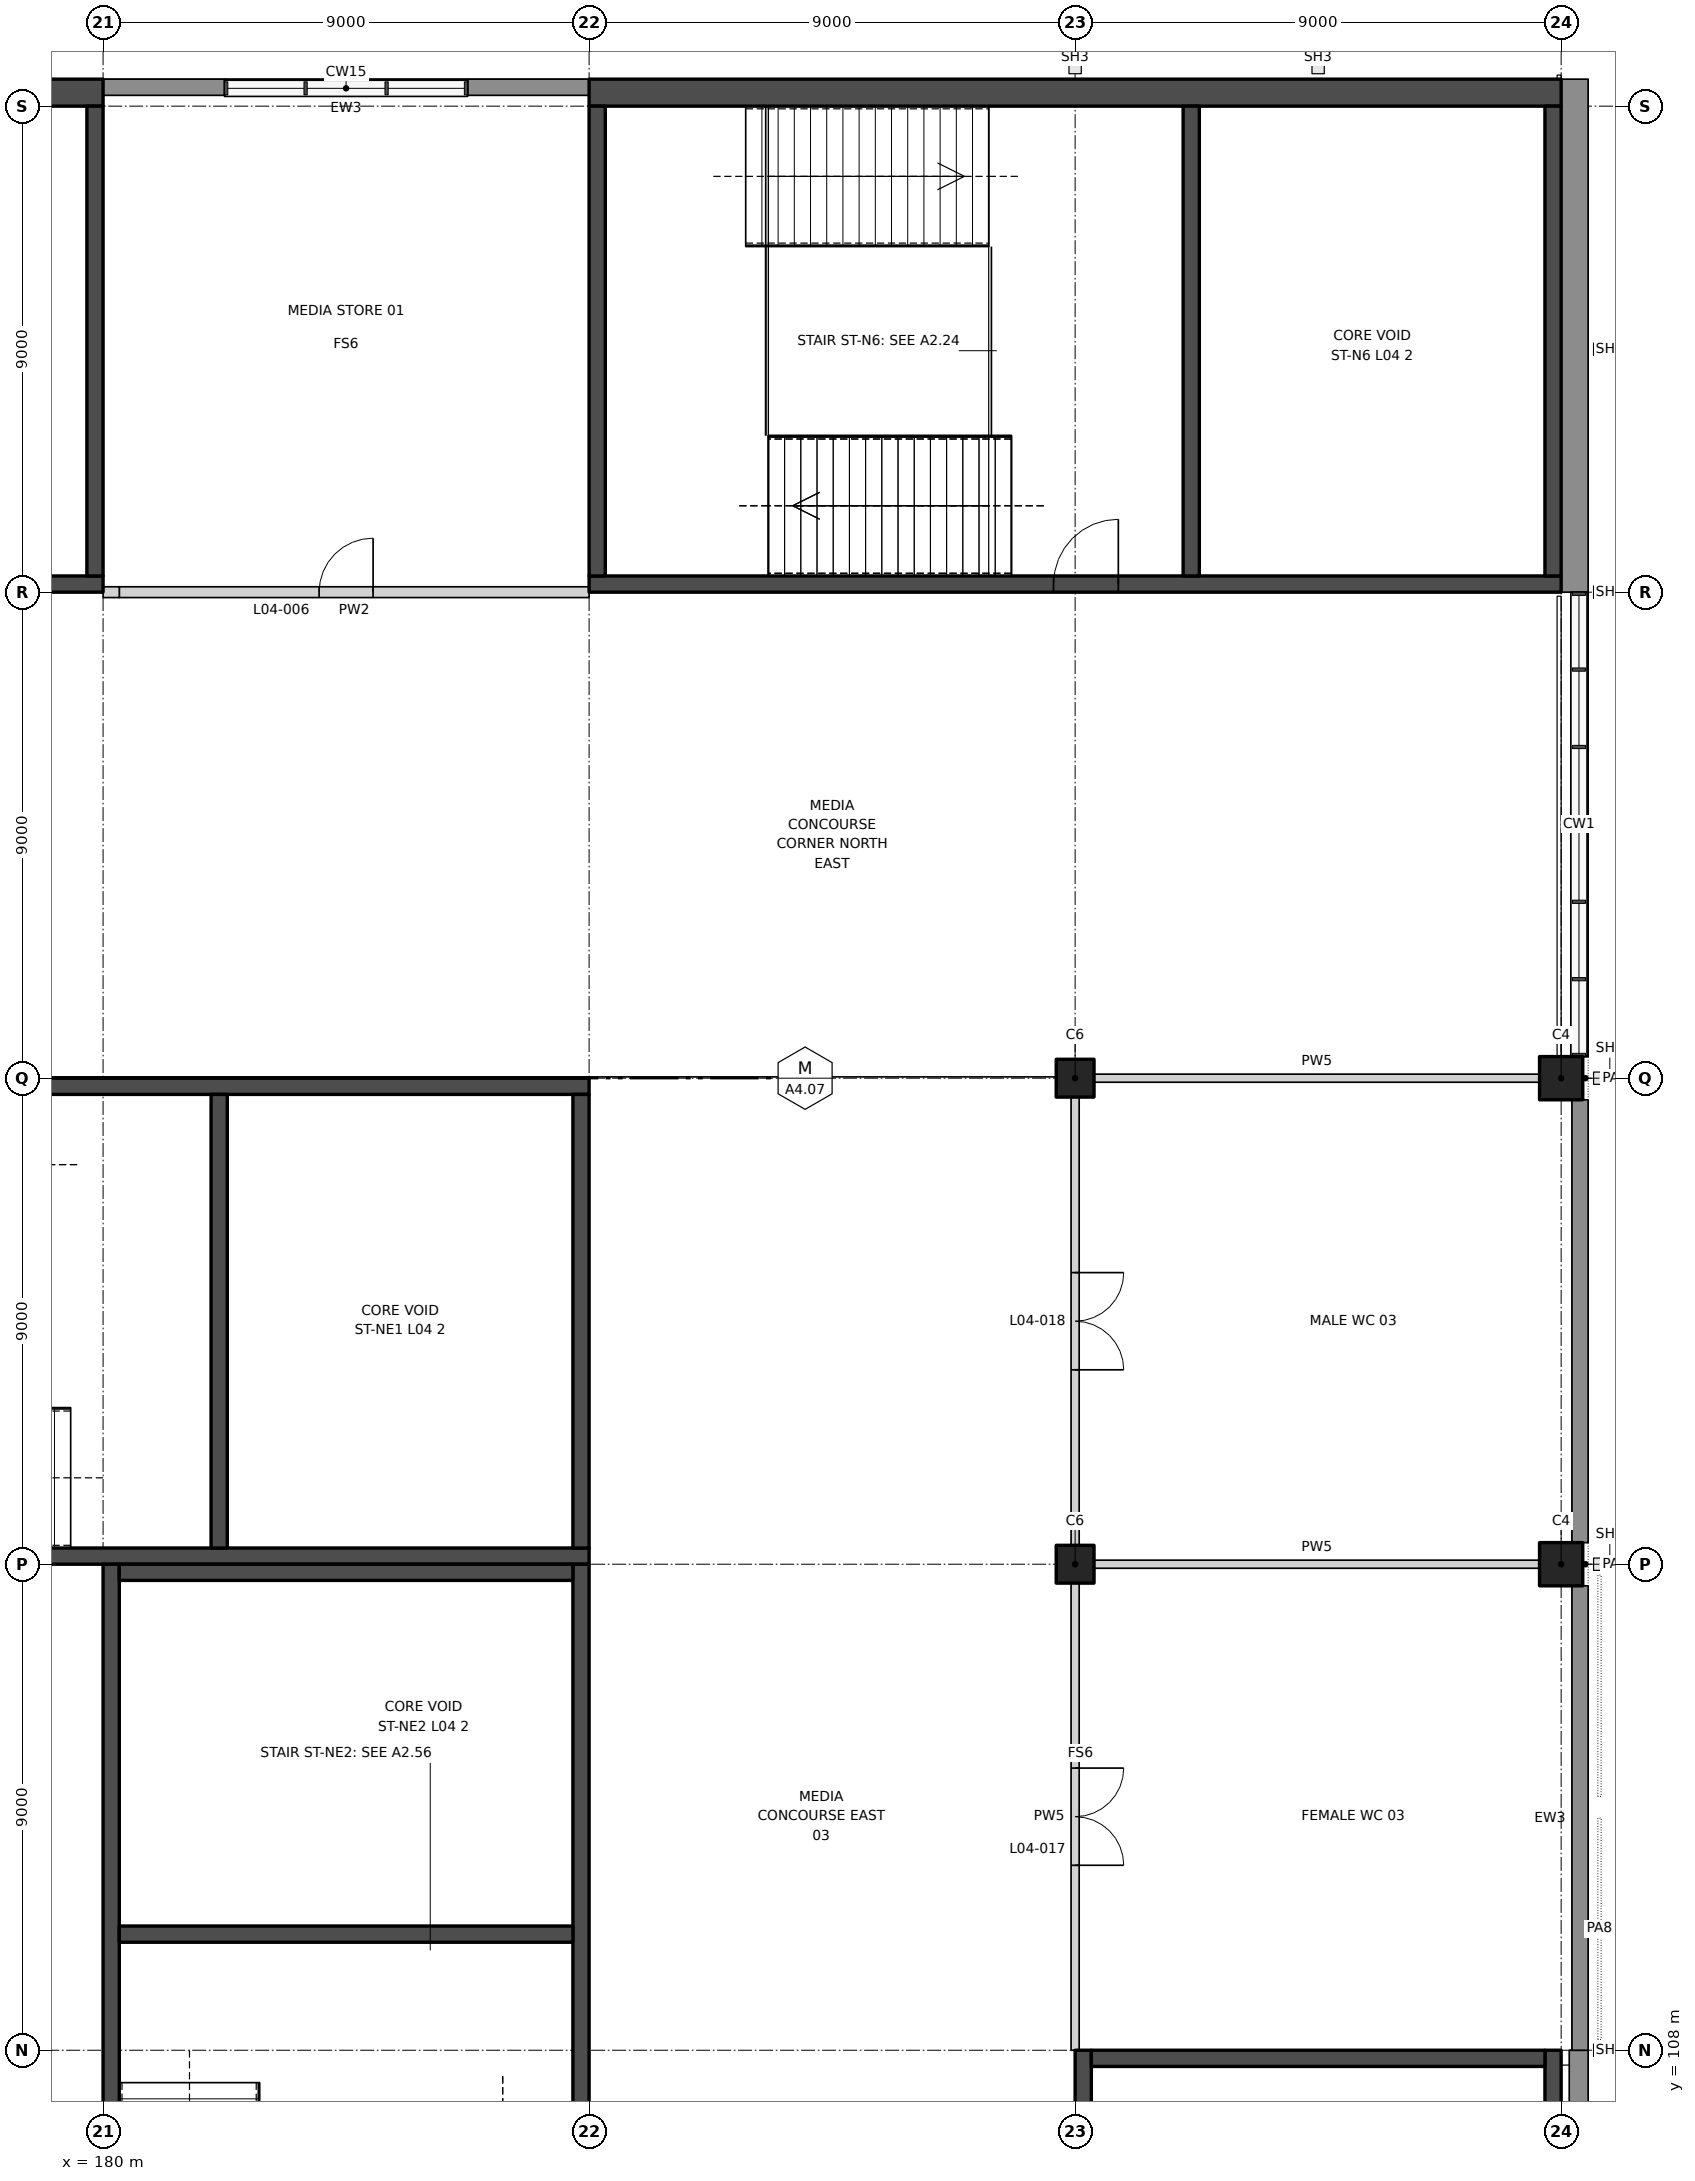
"""IFC4 building model, lengths in metres.
Left out: names, types, materials, properties, quantities, classifications, styles, units other than length and angle.
Written with IfcOpenShell. Run it as: python <this file> out.ifc"""

import sys

from ifc_helpers import new_model, si_unit, direction, frame, frame_2d, origin, origin_2d, place, context, subcontext, project, spatial, rectangle, extrude, element, fill, save


model = new_model("IFC4")
c1 = context("Model", 3, precision=1e-05, world=origin(), true_north=direction((0.0, 1.0)))
c2 = subcontext(c1, "Body", "Model", "MODEL_VIEW")
j1 = project(units=[si_unit("LENGTHUNIT", "METRE"), si_unit("PLANEANGLEUNIT", "RADIAN")], contexts=[c1])
p1 = place(None, origin())
s1 = spatial("IfcSite", under=j1, at=p1, CompositionType="ELEMENT")
p2 = place(p1, origin())
s2 = spatial("IfcBuilding", under=s1, at=p2, CompositionType="ELEMENT")
p3 = place(p2, frame((0.0, 0.0, 28.0)))
s3 = spatial("IfcBuildingStorey", under=s2, at=p3, CompositionType="ELEMENT", Elevation=28.0)
for number, where, z_axis, x_axis in (
    (1, (207.0, 117.0, 0.0), (0.0, 0.0, 1.0), (1.0, 0.0, 0.0)),
    (2, (207.0, 126.0, 0.0), (0.0, 0.0, 1.0), (1.0, 0.0, 0.0)),
):
    element("IfcColumn", number, at=place(p3, frame(where, z_axis=z_axis, x_axis=x_axis)), inside=s3, PredefinedType="COLUMN", context=c2, shape_type="SweptSolid", body=[
        extrude(rectangle(XDim=0.8, YDim=0.8, at=origin_2d()), origin(), (0.0, 0.0, 1.0), 5.5),
    ])
for number, where, z_axis, x_axis in (
    (3, (198.0, 117.0, 0.0), (0.0, 0.0, 1.0), (1.0, 0.0, 0.0)),
    (4, (198.0, 126.0, 0.0), (0.0, 0.0, 1.0), (1.0, 0.0, 0.0)),
):
    element("IfcColumn", number, at=place(p3, frame(where, z_axis=z_axis, x_axis=x_axis)), inside=s3, PredefinedType="COLUMN", context=c2, shape_type="SweptSolid", body=[
        extrude(rectangle(XDim=0.7, YDim=0.7, at=origin_2d()), origin(), (0.0, 0.0, 1.0), 5.5),
    ])
p4 = place(p3, frame((198.35, 117.0, 0.0), z_axis=(0.0, 0.0, 1.0), x_axis=(1.0, 0.0, 0.0)))
e5 = element("IfcWall", 5, at=p4, inside=s3, PredefinedType="PARTITIONING", context=c2, shape_type="SweptSolid", body=[
    extrude(rectangle(XDim=8.25, YDim=0.15, at=frame_2d((4.125, 0.0))), origin(), (0.0, 0.0, 1.0), 9.5),
])
p5 = place(p3, frame((198.35, 126.0, 0.0), z_axis=(0.0, 0.0, 1.0), x_axis=(1.0, 0.0, 0.0)))
e6 = element("IfcWall", 6, at=p5, inside=s3, PredefinedType="PARTITIONING", context=c2, shape_type="SweptSolid", body=[
    extrude(rectangle(XDim=8.25, YDim=0.15, at=frame_2d((4.125, 0.0))), origin(), (0.0, 0.0, 1.0), 4.3),
])
p6 = place(p3, frame((180.3, 135.0, 0.0), z_axis=(0.0, 0.0, 1.0), x_axis=(1.0, 0.0, 0.0)))
e7 = element("IfcWall", 7, at=p6, inside=s3, PredefinedType="PARTITIONING", context=c2, shape_type="SweptSolid", body=[
    extrude(rectangle(XDim=8.7, YDim=0.2, at=frame_2d((4.35, 0.0))), origin(), (0.0, 0.0, 1.0), 4.2),
])
p7 = place(p6, frame((3.7, 0.0, 0.0)))
e8 = element("IfcOpeningElement", 8, at=p7, cuts=e7, PredefinedType="OPENING", context=c2, shape_type="SweptSolid", body=[
    extrude(rectangle(XDim=1.0, YDim=2.1, at=frame_2d((0.5, 1.05))), frame((0.0, 0.11, 0.0), z_axis=(0.0, -1.0, 0.0), x_axis=(1.0, 0.0, 0.0)), (0.0, 0.0, 1.0), 0.22),
])
p8 = place(p3, frame((198.0, 108.0, 0.0), z_axis=(0.0, 0.0, 1.0), x_axis=(0.0, 1.0, 0.0)))
e9 = element("IfcWall", 9, at=p8, inside=s3, PredefinedType="PARTITIONING", context=c2, shape_type="SweptSolid", body=[
    extrude(rectangle(XDim=8.65, YDim=0.15, at=frame_2d((4.325, 0.0))), origin(), (0.0, 0.0, 1.0), 4.2),
])
p9 = place(p8, frame((3.425, 0.0, 0.0)))
e10 = element("IfcOpeningElement", 10, at=p9, cuts=e9, PredefinedType="OPENING", context=c2, shape_type="SweptSolid", body=[
    extrude(rectangle(XDim=1.8, YDim=2.1, at=frame_2d((0.9, 1.05))), frame((0.0, 0.085, 0.0), z_axis=(0.0, -1.0, 0.0), x_axis=(1.0, 0.0, 0.0)), (0.0, 0.0, 1.0), 0.17),
])
p10 = place(p3, frame((198.0, 117.35, 0.0), z_axis=(0.0, 0.0, 1.0), x_axis=(0.0, 1.0, 0.0)))
e11 = element("IfcWall", 11, at=p10, inside=s3, PredefinedType="PARTITIONING", context=c2, shape_type="SweptSolid", body=[
    extrude(rectangle(XDim=8.3, YDim=0.15, at=frame_2d((4.15, 0.0))), origin(), (0.0, 0.0, 1.0), 4.2),
])
p11 = place(p10, frame((3.25, 0.0, 0.0)))
e12 = element("IfcOpeningElement", 12, at=p11, cuts=e11, PredefinedType="OPENING", context=c2, shape_type="SweptSolid", body=[
    extrude(rectangle(XDim=1.8, YDim=2.1, at=frame_2d((0.9, 1.05))), frame((0.0, 0.085, 0.0), z_axis=(0.0, -1.0, 0.0), x_axis=(1.0, 0.0, 0.0)), (0.0, 0.0, 1.0), 0.17),
])
p12 = place(p3, frame((207.325, 99.0, 0.0), z_axis=(0.0, 0.0, 1.0), x_axis=(0.0, 1.0, 0.0)))
e13 = element("IfcWall", 13, at=p12, inside=s3, PredefinedType="SOLIDWALL", context=c2, shape_type="SweptSolid", body=[
    extrude(rectangle(XDim=9.0, YDim=0.35, at=frame_2d((4.5, 0.0))), origin(), (0.0, 0.0, 1.0), 5.5),
])
p13 = place(p3, frame((207.35, 108.0, 0.0), z_axis=(0.0, 0.0, 1.0), x_axis=(0.0, 1.0, 0.0)))
e14 = element("IfcWall", 14, at=p13, inside=s3, PredefinedType="SOLIDWALL", context=c2, shape_type="SweptSolid", body=[
    extrude(rectangle(XDim=8.6, YDim=0.3, at=frame_2d((4.3, 0.0))), origin(), (0.0, 0.0, 1.0), 5.5),
])
p14 = place(p3, frame((207.35, 117.4, 0.0), z_axis=(0.0, 0.0, 1.0), x_axis=(0.0, 1.0, 0.0)))
e15 = element("IfcWall", 15, at=p14, inside=s3, PredefinedType="SOLIDWALL", context=c2, shape_type="SweptSolid", body=[
    extrude(rectangle(XDim=8.2, YDim=0.3, at=frame_2d((4.1, 0.0))), origin(), (0.0, 0.0, 1.0), 5.5),
])
p15 = place(p3, frame((207.35, 126.4, 0.0), z_axis=(0.0, 0.0, 1.0), x_axis=(0.0, 1.0, 0.0)))
e16 = element("IfcWall", 16, at=p15, inside=s3, PredefinedType="SOLIDWALL", context=c2, shape_type="SweptSolid", body=[
    extrude(rectangle(XDim=8.6, YDim=0.3, at=frame_2d((4.3, 0.0))), origin(), (0.0, 0.0, 1.0), 1.0),
])
p16 = place(p3, frame((207.25, 135.0, 0.0), z_axis=(0.0, 0.0, 1.0), x_axis=(0.0, 1.0, 0.0)))
e17 = element("IfcWall", 17, at=p16, inside=s3, PredefinedType="SOLIDWALL", context=c2, shape_type="SweptSolid", body=[
    extrude(rectangle(XDim=9.5, YDim=0.5, at=frame_2d((4.75, 0.0))), origin(), (0.0, 0.0, 1.0), 5.5),
])
for number, where, z_axis, x_axis in (
    (18, (182.25, 144.35, 0.0), (0.0, 0.0, 1.0), (-1.0, 0.0, 0.0)),
    (19, (189.0, 144.35, 0.0), (0.0, 0.0, 1.0), (-1.0, 0.0, 0.0)),
):
    element("IfcWall", number, at=place(p3, frame(where, z_axis=z_axis, x_axis=x_axis)), inside=s3, PredefinedType="SOLIDWALL", context=c2, shape_type="SweptSolid", body=[
        extrude(rectangle(XDim=2.25, YDim=0.3, at=frame_2d((1.125, 0.0))), origin(), (0.0, 0.0, 1.0), 4.9),
    ])
p17 = place(p3, frame((186.75, 144.35, 0.0), z_axis=(0.0, 0.0, 1.0), x_axis=(-1.0, 0.0, 0.0)))
e20 = element("IfcWall", 20, at=p17, inside=s3, PredefinedType="SOLIDWALL", context=c2, shape_type="SweptSolid", body=[
    extrude(rectangle(XDim=4.5, YDim=0.3, at=frame_2d((2.25, 0.0))), origin(), (0.0, 0.0, 1.0), 1.0),
])
p18 = place(p3, frame((180.0, 135.15, 0.0), z_axis=(0.0, 0.0, 1.0), x_axis=(-1.0, 0.0, 0.0)))
e21 = element("IfcWall", 21, at=p18, inside=s3, PredefinedType="SHEAR", context=c2, shape_type="SweptSolid", body=[
    extrude(rectangle(XDim=18.0, YDim=0.3, at=frame_2d((9.0, 0.0))), origin(), (0.0, 0.0, 1.0), 5.5),
])
p19 = place(p18, frame((8.6, 0.0, 0.0)))
e22 = element("IfcOpeningElement", 22, at=p19, cuts=e21, PredefinedType="OPENING", context=c2, shape_type="SweptSolid", body=[
    extrude(rectangle(XDim=1.2, YDim=2.1, at=frame_2d((0.6, 1.05))), frame((0.0, 0.16, 0.0), z_axis=(0.0, -1.0, 0.0), x_axis=(1.0, 0.0, 0.0)), (0.0, 0.0, 1.0), 0.32),
])
p20 = place(p3, frame((180.0, 144.25, 0.0), z_axis=(0.0, 0.0, 1.0), x_axis=(-1.0, 0.0, 0.0)))
e23 = element("IfcWall", 23, at=p20, inside=s3, PredefinedType="SHEAR", context=c2, shape_type="SweptSolid", body=[
    extrude(rectangle(XDim=18.0, YDim=0.5, at=frame_2d((9.0, 0.0))), origin(), (0.0, 0.0, 1.0), 5.5),
])
p21 = place(p3, frame((179.85, 135.3, 0.0), z_axis=(0.0, 0.0, 1.0), x_axis=(0.0, 1.0, 0.0)))
e24 = element("IfcWall", 24, at=p21, inside=s3, PredefinedType="SHEAR", context=c2, shape_type="SweptSolid", body=[
    extrude(rectangle(XDim=8.7, YDim=0.3, at=frame_2d((4.35, 0.0))), origin(), (0.0, 0.0, 1.0), 5.5),
])
p22 = place(p3, frame((189.0, 135.15, 0.0), z_axis=(0.0, 0.0, 1.0), x_axis=(1.0, 0.0, 0.0)))
e25 = element("IfcWall", 25, at=p22, inside=s3, PredefinedType="SHEAR", context=c2, shape_type="SweptSolid", body=[
    extrude(rectangle(XDim=18.0, YDim=0.3, at=frame_2d((9.0, 0.0))), origin(), (0.0, 0.0, 1.0), 5.5),
])
p23 = place(p22, frame((8.6, 0.0, 0.0)))
e26 = element("IfcOpeningElement", 26, at=p23, cuts=e25, PredefinedType="OPENING", context=c2, shape_type="SweptSolid", body=[
    extrude(rectangle(XDim=1.2, YDim=2.1, at=frame_2d((0.6, 1.05))), frame((0.0, 0.16, 0.0), z_axis=(0.0, -1.0, 0.0), x_axis=(1.0, 0.0, 0.0)), (0.0, 0.0, 1.0), 0.32),
])
p24 = place(p3, frame((189.0, 144.25, 0.0), z_axis=(0.0, 0.0, 1.0), x_axis=(1.0, 0.0, 0.0)))
e27 = element("IfcWall", 27, at=p24, inside=s3, PredefinedType="SHEAR", context=c2, shape_type="SweptSolid", body=[
    extrude(rectangle(XDim=18.0, YDim=0.5, at=frame_2d((9.0, 0.0))), origin(), (0.0, 0.0, 1.0), 5.5),
])
for number, where, z_axis, x_axis in (
    (28, (189.15, 135.3, 0.0), (0.0, 0.0, 1.0), (0.0, 1.0, 0.0)),
    (29, (206.85, 135.3, 0.0), (0.0, 0.0, 1.0), (0.0, 1.0, 0.0)),
    (30, (200.15, 135.3, 0.0), (0.0, 0.0, 1.0), (0.0, 1.0, 0.0)),
):
    element("IfcWall", number, at=place(p3, frame(where, z_axis=z_axis, x_axis=x_axis)), inside=s3, PredefinedType="SHEAR", context=c2, shape_type="SweptSolid", body=[
        extrude(rectangle(XDim=8.7, YDim=0.3, at=frame_2d((4.35, 0.0))), origin(), (0.0, 0.0, 1.0), 5.5),
    ])
p25 = place(p3, frame((198.15, 108.0, 0.0), z_axis=(0.0, 0.0, 1.0), x_axis=(0.0, -1.0, 0.0)))
e31 = element("IfcWall", 31, at=p25, inside=s3, PredefinedType="SHEAR", context=c2, shape_type="SweptSolid", body=[
    extrude(rectangle(XDim=18.0, YDim=0.3, at=frame_2d((9.0, 0.0))), origin(), (0.0, 0.0, 1.0), 5.5),
])
p26 = place(p25, frame((1.5, 0.0, 0.0)))
e32 = element("IfcOpeningElement", 32, at=p26, cuts=e31, PredefinedType="OPENING", context=c2, shape_type="SweptSolid", body=[
    extrude(rectangle(XDim=1.2, YDim=2.1, at=frame_2d((0.6, 1.05))), frame((0.0, 0.16, 0.0), z_axis=(0.0, -1.0, 0.0), x_axis=(1.0, 0.0, 0.0)), (0.0, 0.0, 1.0), 0.32),
])
p27 = place(p3, frame((206.85, 108.0, 0.0), z_axis=(0.0, 0.0, 1.0), x_axis=(0.0, -1.0, 0.0)))
e33 = element("IfcWall", 33, at=p27, inside=s3, PredefinedType="SHEAR", context=c2, shape_type="SweptSolid", body=[
    extrude(rectangle(XDim=18.0, YDim=0.3, at=frame_2d((9.0, 0.0))), origin(), (0.0, 0.0, 1.0), 5.5),
])
p28 = place(p3, frame((198.3, 107.85, 0.0), z_axis=(0.0, 0.0, 1.0), x_axis=(1.0, 0.0, 0.0)))
e34 = element("IfcWall", 34, at=p28, inside=s3, PredefinedType="SHEAR", context=c2, shape_type="SweptSolid", body=[
    extrude(rectangle(XDim=8.4, YDim=0.3, at=frame_2d((4.2, 0.0))), origin(), (0.0, 0.0, 1.0), 5.5),
])
p29 = place(p3, frame((171.0, 117.15, 0.0), z_axis=(0.0, 0.0, 1.0), x_axis=(1.0, 0.0, 0.0)))
e35 = element("IfcWall", 35, at=p29, inside=s3, PredefinedType="SHEAR", context=c2, shape_type="SweptSolid", body=[
    extrude(rectangle(XDim=18.0, YDim=0.3, at=frame_2d((9.0, 0.0))), origin(), (0.0, 0.0, 1.0), 5.5),
])
p30 = place(p29, frame((1.5, 0.0, 0.0)))
e36 = element("IfcOpeningElement", 36, at=p30, cuts=e35, PredefinedType="OPENING", context=c2, shape_type="SweptSolid", body=[
    extrude(rectangle(XDim=1.2, YDim=2.1, at=frame_2d((0.6, 1.05))), frame((0.0, 0.16, 0.0), z_axis=(0.0, -1.0, 0.0), x_axis=(1.0, 0.0, 0.0)), (0.0, 0.0, 1.0), 0.32),
])
p31 = place(p3, frame((171.0, 125.85, 0.0), z_axis=(0.0, 0.0, 1.0), x_axis=(1.0, 0.0, 0.0)))
e37 = element("IfcWall", 37, at=p31, inside=s3, PredefinedType="SHEAR", context=c2, shape_type="SweptSolid", body=[
    extrude(rectangle(XDim=18.0, YDim=0.3, at=frame_2d((9.0, 0.0))), origin(), (0.0, 0.0, 1.0), 5.5),
])
for number, where, z_axis, x_axis in (
    (38, (188.85, 117.3, 0.0), (0.0, 0.0, 1.0), (0.0, 1.0, 0.0)),
    (39, (182.15, 117.3, 0.0), (0.0, 0.0, 1.0), (0.0, 1.0, 0.0)),
):
    element("IfcWall", number, at=place(p3, frame(where, z_axis=z_axis, x_axis=x_axis)), inside=s3, PredefinedType="SHEAR", context=c2, shape_type="SweptSolid", body=[
        extrude(rectangle(XDim=8.4, YDim=0.3, at=frame_2d((4.2, 0.0))), origin(), (0.0, 0.0, 1.0), 5.5),
    ])
p32 = place(p3, frame((180.15, 99.0, 0.0), z_axis=(0.0, 0.0, 1.0), x_axis=(0.0, 1.0, 0.0)))
e40 = element("IfcWall", 40, at=p32, inside=s3, PredefinedType="SHEAR", context=c2, shape_type="SweptSolid", body=[
    extrude(rectangle(XDim=18.0, YDim=0.3, at=frame_2d((9.0, 0.0))), origin(), (0.0, 0.0, 1.0), 5.5),
])
p33 = place(p32, frame((1.5, 0.0, 0.0)))
e41 = element("IfcOpeningElement", 41, at=p33, cuts=e40, PredefinedType="OPENING", context=c2, shape_type="SweptSolid", body=[
    extrude(rectangle(XDim=1.2, YDim=2.1, at=frame_2d((0.6, 1.05))), frame((0.0, 0.16, 0.0), z_axis=(0.0, -1.0, 0.0), x_axis=(1.0, 0.0, 0.0)), (0.0, 0.0, 1.0), 0.32),
])
p34 = place(p3, frame((188.85, 99.0, 0.0), z_axis=(0.0, 0.0, 1.0), x_axis=(0.0, 1.0, 0.0)))
e42 = element("IfcWall", 42, at=p34, inside=s3, PredefinedType="SHEAR", context=c2, shape_type="SweptSolid", body=[
    extrude(rectangle(XDim=18.0, YDim=0.3, at=frame_2d((9.0, 0.0))), origin(), (0.0, 0.0, 1.0), 5.5),
])
for number, where, z_axis, x_axis in (
    (43, (180.3, 116.85, 0.0), (0.0, 0.0, 1.0), (1.0, 0.0, 0.0)),
    (44, (180.3, 110.15, 0.0), (0.0, 0.0, 1.0), (1.0, 0.0, 0.0)),
):
    element("IfcWall", number, at=place(p3, frame(where, z_axis=z_axis, x_axis=x_axis)), inside=s3, PredefinedType="SHEAR", context=c2, shape_type="SweptSolid", body=[
        extrude(rectangle(XDim=8.4, YDim=0.3, at=frame_2d((4.2, 0.0))), origin(), (0.0, 0.0, 1.0), 5.5),
    ])
p35 = place(p3, frame((180.0, 135.0, 0.0), z_axis=(0.0, 0.0, 1.0), x_axis=(1.0, 0.0, 0.0)))
e45 = element("IfcWall", 45, at=p35, inside=s3, PredefinedType="PARTITIONING", context=c2, shape_type="SweptSolid", body=[
    extrude(rectangle(XDim=0.3, YDim=0.2, at=frame_2d((0.15, 0.0))), origin(), (0.0, 0.0, 1.0), 5.5),
])
p36 = place(p7, origin())
e46 = element("IfcDoor", 46, at=p36, inside=s3, OperationType="SINGLE_SWING_RIGHT", PredefinedType="DOOR", context=c2, shape_type="SweptSolid", body=[
    extrude(rectangle(XDim=1.0, YDim=2.1, at=frame_2d((0.5, 1.05))), frame((0.0, 0.025, 0.0), z_axis=(0.0, -1.0, 0.0), x_axis=(1.0, 0.0, 0.0)), (0.0, 0.0, 1.0), 0.05),
])
fill(e8, e46)
p37 = place(p9, frame((1.8, 0.0, 0.0), z_axis=(0.0, 0.0, 1.0), x_axis=(-1.0, 0.0, 0.0)))
e47 = element("IfcDoor", 47, at=p37, inside=s3, OperationType="DOUBLE_DOOR_DOUBLE_SWING", PredefinedType="DOOR", context=c2, shape_type="SweptSolid", body=[
    extrude(rectangle(XDim=1.8, YDim=2.1, at=frame_2d((0.9, 1.05))), frame((0.0, 0.025, 0.0), z_axis=(0.0, -1.0, 0.0), x_axis=(1.0, 0.0, 0.0)), (0.0, 0.0, 1.0), 0.05),
])
fill(e10, e47)
p38 = place(p11, frame((1.8, 0.0, 0.0), z_axis=(0.0, 0.0, 1.0), x_axis=(-1.0, 0.0, 0.0)))
e48 = element("IfcDoor", 48, at=p38, inside=s3, OperationType="DOUBLE_DOOR_DOUBLE_SWING", PredefinedType="DOOR", context=c2, shape_type="SweptSolid", body=[
    extrude(rectangle(XDim=1.8, YDim=2.1, at=frame_2d((0.9, 1.05))), frame((0.0, 0.025, 0.0), z_axis=(0.0, -1.0, 0.0), x_axis=(1.0, 0.0, 0.0)), (0.0, 0.0, 1.0), 0.05),
])
fill(e12, e48)
p39 = place(p23, origin())
e49 = element("IfcDoor", 49, at=p39, inside=s3, OperationType="SINGLE_SWING_RIGHT", PredefinedType="DOOR", context=c2, shape_type="SweptSolid", body=[
    extrude(rectangle(XDim=1.2, YDim=2.1, at=frame_2d((0.6, 1.05))), frame((0.0, 0.025, 0.0), z_axis=(0.0, -1.0, 0.0), x_axis=(1.0, 0.0, 0.0)), (0.0, 0.0, 1.0), 0.05),
])
fill(e26, e49)
save(model, sys.argv[1])
